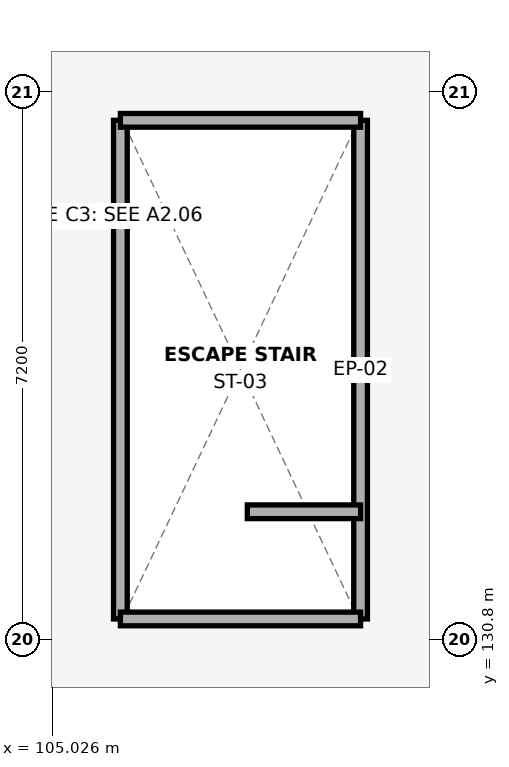
"""IFC4 building model, lengths in metres.
Left out: names, types, materials, properties, quantities, classifications, styles, units other than length and angle.
Written with IfcOpenShell. Run it as: python <this file> out.ifc"""

import sys

from ifc_helpers import new_model, si_unit, direction, frame, frame_2d, origin, place, context, subcontext, project, spatial, rectangle, extrude, element, save


model = new_model("IFC4")
c1 = context("Model", 3, precision=1e-05, world=origin(), true_north=direction((0.0, 1.0)))
c2 = subcontext(c1, "Body", "Model", "MODEL_VIEW")
j1 = project(units=[si_unit("LENGTHUNIT", "METRE"), si_unit("PLANEANGLEUNIT", "RADIAN")], contexts=[c1])
p1 = place(None, origin())
s1 = spatial("IfcSite", under=j1, at=p1, CompositionType="ELEMENT")
p2 = place(p1, origin())
s2 = spatial("IfcBuilding", under=s1, at=p2, CompositionType="ELEMENT")
p3 = place(p2, frame((0.0, 0.0, 24.9)))
s3 = spatial("IfcBuildingStorey", under=s2, at=p3, CompositionType="ELEMENT", Elevation=24.9)
for number, where, z_axis, x_axis in (
    (1, (105.92, 131.07, 0.0), (0.0, 0.0, 1.0), (0.0, 1.0, 0.0)),
    (2, (109.08, 131.07, 0.0), (0.0, 0.0, 1.0), (0.0, 1.0, 0.0)),
):
    element("IfcWall", number, at=place(p3, frame(where, z_axis=z_axis, x_axis=x_axis)), inside=s3, PredefinedType="PARAPET", context=c2, shape_type="SweptSolid", body=[
        extrude(rectangle(XDim=6.56, YDim=0.18, at=frame_2d((3.28, 0.0))), origin(), (0.0, 0.0, 1.0), 1.15),
    ])
for number, where, z_axis, x_axis in (
    (3, (105.92, 137.63, 0.0), (0.0, 0.0, 1.0), (1.0, 0.0, 0.0)),
    (4, (105.92, 131.07, 0.0), (0.0, 0.0, 1.0), (1.0, 0.0, 0.0)),
):
    element("IfcWall", number, at=place(p3, frame(where, z_axis=z_axis, x_axis=x_axis)), inside=s3, PredefinedType="PARAPET", context=c2, shape_type="SweptSolid", body=[
        extrude(rectangle(XDim=3.16, YDim=0.18, at=frame_2d((1.58, 0.0))), origin(), (0.0, 0.0, 1.0), 1.15),
    ])
p4 = place(p3, frame((107.59, 132.48, 0.0), z_axis=(0.0, 0.0, 1.0), x_axis=(1.0, 0.0, 0.0)))
e5 = element("IfcWall", 5, at=p4, inside=s3, PredefinedType="PARAPET", context=c2, shape_type="SweptSolid", body=[
    extrude(rectangle(XDim=1.49, YDim=0.18, at=frame_2d((0.745, 0.0))), origin(), (0.0, 0.0, 1.0), 1.15),
])
save(model, sys.argv[1])
